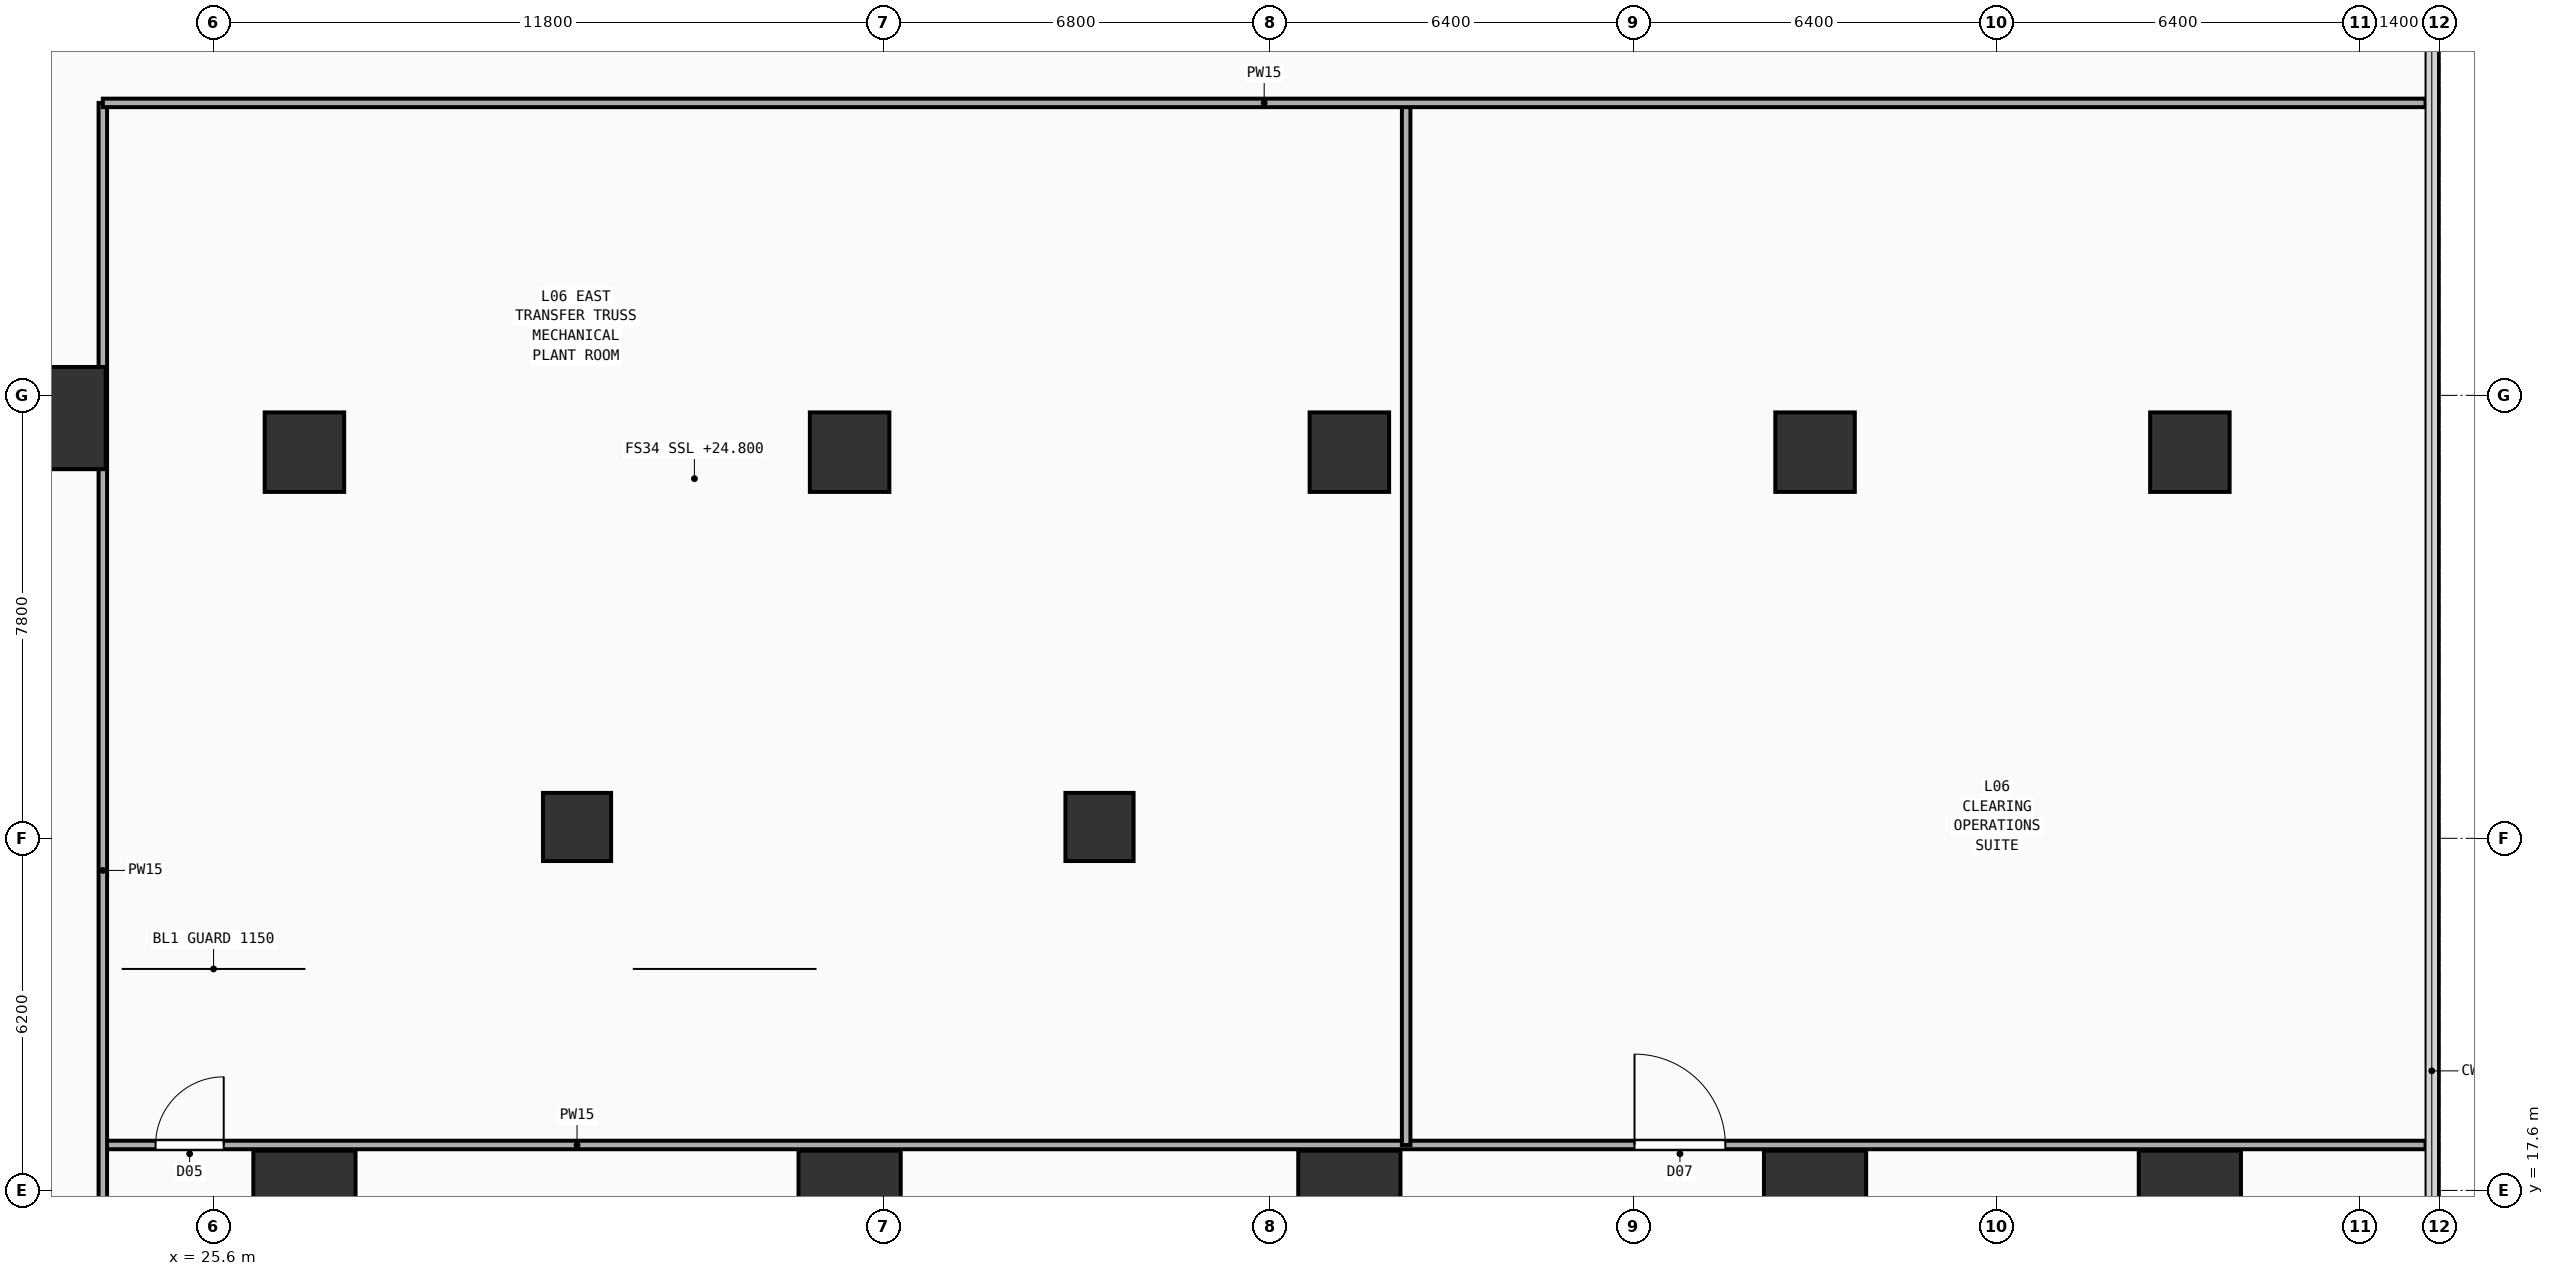
"""IFC4 building model, lengths in metres.
Left out: names, types, materials, properties, quantities, classifications, styles, units other than length and angle.
Written with IfcOpenShell. Run it as: python <this file> out.ifc"""

import sys

from ifc_helpers import new_model, si_unit, direction, frame, frame_2d, origin, origin_2d, place, context, subcontext, project, spatial, rectangle, circle, extrude, element, fill, save


model = new_model("IFC4")
c1 = context("Model", 3, precision=1e-05, world=origin(), true_north=direction((0.0, 1.0)))
c2 = subcontext(c1, "Body", "Model", "MODEL_VIEW")
j1 = project(units=[si_unit("LENGTHUNIT", "METRE"), si_unit("PLANEANGLEUNIT", "RADIAN")], contexts=[c1])
p1 = place(None, origin())
s1 = spatial("IfcSite", under=j1, at=p1, CompositionType="ELEMENT")
p2 = place(p1, origin())
s2 = spatial("IfcBuilding", under=s1, at=p2, CompositionType="ELEMENT")
p3 = place(p2, frame((0.0, 0.0, 24.8)))
s3 = spatial("IfcBuildingStorey", under=s2, at=p3, CompositionType="ELEMENT", Elevation=24.8)
for number, where, z_axis, x_axis in (
    (1, (27.2, 17.4, 0.0), (0.0, 0.0, 1.0), (1.0, 0.0, 0.0)),
    (2, (36.8, 17.4, 0.0), (0.0, 0.0, 1.0), (1.0, 0.0, 0.0)),
    (3, (45.6, 17.4, 0.0), (0.0, 0.0, 1.0), (1.0, 0.0, 0.0)),
    (4, (53.8, 17.4, 0.0), (0.0, 0.0, 1.0), (1.0, 0.0, 0.0)),
    (5, (60.4, 17.4, 0.0), (0.0, 0.0, 1.0), (1.0, 0.0, 0.0)),
    (6, (22.8, 31.2, 0.0), (0.0, 0.0, 1.0), (1.0, 0.0, 0.0)),
):
    element("IfcColumn", number, at=place(p3, frame(where, z_axis=z_axis, x_axis=x_axis)), inside=s3, PredefinedType="COLUMN", context=c2, shape_type="SweptSolid", body=[
        extrude(rectangle(XDim=1.8, YDim=1.8, at=origin_2d()), origin(), (0.0, 0.0, 1.0), 4.35),
    ])
for number, where, z_axis, x_axis in (
    (7, (27.2, 30.6, 0.0), (0.0, 0.0, 1.0), (1.0, 0.0, 0.0)),
    (8, (36.8, 30.6, 0.0), (0.0, 0.0, 1.0), (1.0, 0.0, 0.0)),
    (9, (45.6, 30.6, 0.0), (0.0, 0.0, 1.0), (1.0, 0.0, 0.0)),
    (10, (53.8, 30.6, 0.0), (0.0, 0.0, 1.0), (1.0, 0.0, 0.0)),
    (11, (60.4, 30.6, 0.0), (0.0, 0.0, 1.0), (1.0, 0.0, 0.0)),
):
    element("IfcColumn", number, at=place(p3, frame(where, z_axis=z_axis, x_axis=x_axis)), inside=s3, PredefinedType="COLUMN", context=c2, shape_type="SweptSolid", body=[
        extrude(rectangle(XDim=1.4, YDim=1.4, at=origin_2d()), origin(), (0.0, 0.0, 1.0), 4.35),
    ])
for number, where, z_axis, x_axis in (
    (12, (32.0, 24.0, 0.0), (0.0, 0.0, 1.0), (1.0, 0.0, 0.0)),
    (13, (41.2, 24.0, 0.0), (0.0, 0.0, 1.0), (1.0, 0.0, 0.0)),
):
    element("IfcColumn", number, at=place(p3, frame(where, z_axis=z_axis, x_axis=x_axis)), inside=s3, PredefinedType="COLUMN", context=c2, shape_type="SweptSolid", body=[
        extrude(circle(Radius=0.6, at=origin_2d()), origin(), (0.0, 0.0, 1.0), 4.35),
    ])
p4 = place(p3, frame((23.65, 18.4, 0.0), z_axis=(0.0, 0.0, 1.0), x_axis=(1.0, 0.0, 0.0)))
e14 = element("IfcWall", 14, at=p4, inside=s3, PredefinedType="PARTITIONING", context=c2, shape_type="SweptSolid", body=[
    extrude(rectangle(XDim=40.9, YDim=0.15, at=frame_2d((20.45, 0.0))), origin(), (0.0, 0.0, 1.0), 4.35),
])
p5 = place(p4, frame((0.929, 0.0, 0.0)))
e15 = element("IfcOpeningElement", 15, at=p5, cuts=e14, PredefinedType="OPENING", context=c2, shape_type="SweptSolid", body=[
    extrude(rectangle(XDim=1.2, YDim=2.25, at=frame_2d((0.6, 1.125))), frame((0.0, 0.085, 0.0), z_axis=(0.0, -1.0, 0.0), x_axis=(1.0, 0.0, 0.0)), (0.0, 0.0, 1.0), 0.17),
])
p6 = place(p4, frame((26.971, 0.0, 0.0)))
e16 = element("IfcOpeningElement", 16, at=p6, cuts=e14, PredefinedType="OPENING", context=c2, shape_type="SweptSolid", body=[
    extrude(rectangle(XDim=1.6, YDim=2.4, at=frame_2d((0.8, 1.2))), frame((0.0, 0.085, 0.0), z_axis=(0.0, -1.0, 0.0), x_axis=(1.0, 0.0, 0.0)), (0.0, 0.0, 1.0), 0.17),
])
p7 = place(p3, frame((23.65, 16.35, 0.0), z_axis=(0.0, 0.0, 1.0), x_axis=(0.0, 1.0, 0.0)))
e17 = element("IfcWall", 17, at=p7, inside=s3, PredefinedType="PARTITIONING", context=c2, shape_type="SweptSolid", body=[
    extrude(rectangle(XDim=20.4, YDim=0.15, at=frame_2d((10.2, 0.0))), origin(), (0.0, 0.0, 1.0), 4.35),
])
p8 = place(p3, frame((46.6, 18.4, 0.0), z_axis=(0.0, 0.0, 1.0), x_axis=(0.0, 1.0, 0.0)))
e18 = element("IfcWall", 18, at=p8, inside=s3, PredefinedType="PARTITIONING", context=c2, shape_type="SweptSolid", body=[
    extrude(rectangle(XDim=18.35, YDim=0.15, at=frame_2d((9.175, 0.0))), origin(), (0.0, 0.0, 1.0), 4.35),
])
p9 = place(p3, frame((23.65, 36.75, 0.0), z_axis=(0.0, 0.0, 1.0), x_axis=(1.0, 0.0, 0.0)))
e19 = element("IfcWall", 19, at=p9, inside=s3, PredefinedType="PARTITIONING", context=c2, shape_type="SweptSolid", body=[
    extrude(rectangle(XDim=40.9, YDim=0.15, at=frame_2d((20.45, 0.0))), origin(), (0.0, 0.0, 1.0), 4.35),
])
p10 = place(p5, origin())
e20 = element("IfcDoor", 20, at=p10, inside=s3, OperationType="SINGLE_SWING_RIGHT", PredefinedType="DOOR", context=c2, shape_type="SweptSolid", body=[
    extrude(rectangle(XDim=1.2, YDim=2.25, at=frame_2d((0.6, 1.125))), frame((0.0, 0.025, 0.0), z_axis=(0.0, -1.0, 0.0), x_axis=(1.0, 0.0, 0.0)), (0.0, 0.0, 1.0), 0.05),
])
fill(e15, e20)
p11 = place(p6, origin())
e21 = element("IfcDoor", 21, at=p11, inside=s3, OperationType="SINGLE_SWING_LEFT", PredefinedType="DOOR", context=c2, shape_type="SweptSolid", body=[
    extrude(rectangle(XDim=1.6, YDim=2.4, at=frame_2d((0.8, 1.2))), frame((0.0, 0.025, 0.0), z_axis=(0.0, -1.0, 0.0), x_axis=(1.0, 0.0, 0.0)), (0.0, 0.0, 1.0), 0.05),
])
fill(e16, e21)
save(model, sys.argv[1])
